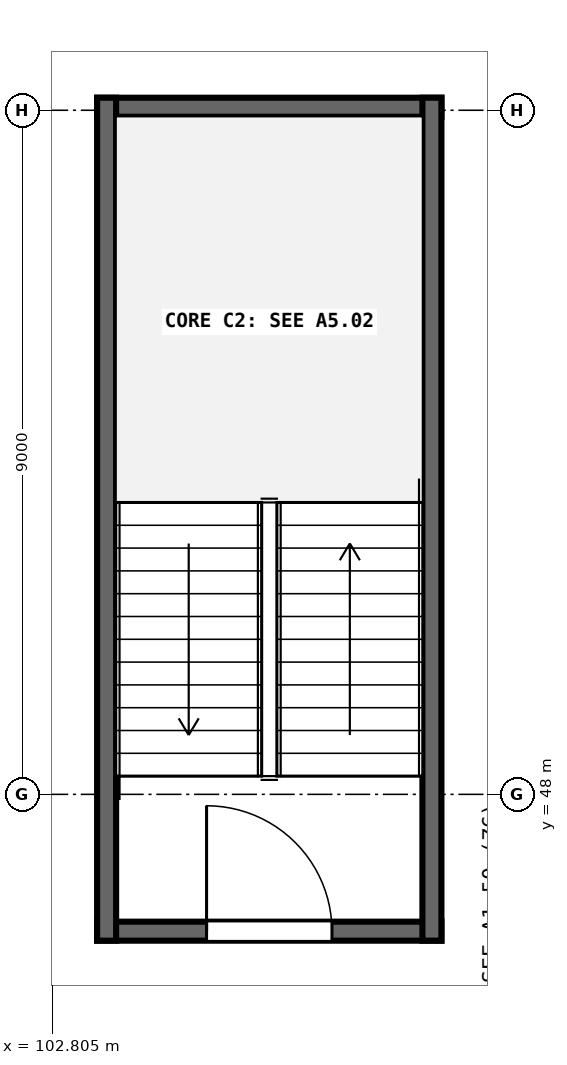
"""IFC4 building model, lengths in metres.
Left out: names, types, materials, properties, quantities, classifications, styles, units other than length and angle.
Written with IfcOpenShell. Run it as: python <this file> out.ifc"""

import sys

from ifc_helpers import new_model, si_unit, direction, frame, frame_2d, origin, place, context, subcontext, project, spatial, rectangle, extrude, element, fill, save


model = new_model("IFC4")
c1 = context("Model", 3, precision=1e-05, world=origin(), true_north=direction((0.0, 1.0)))
c2 = subcontext(c1, "Body", "Model", "MODEL_VIEW")
j1 = project(units=[si_unit("LENGTHUNIT", "METRE"), si_unit("PLANEANGLEUNIT", "RADIAN")], contexts=[c1])
p1 = place(None, origin())
s1 = spatial("IfcSite", under=j1, at=p1, CompositionType="ELEMENT")
p2 = place(p1, origin())
s2 = spatial("IfcBuilding", under=s1, at=p2, CompositionType="ELEMENT")
p3 = place(p2, frame((0.0, 0.0, 19.2)))
s3 = spatial("IfcBuildingStorey", under=s2, at=p3, CompositionType="ELEMENT", Elevation=19.2)
p4 = place(p3, frame((103.395, 46.2, 0.0), z_axis=(0.0, 0.0, 1.0), x_axis=(1.0, 0.0, 0.0)))
e1 = element("IfcWall", 1, at=p4, inside=s3, PredefinedType="SHEAR", context=c2, shape_type="SweptSolid", body=[
    extrude(rectangle(XDim=4.53, YDim=0.25, at=frame_2d((2.265, 0.0))), origin(), (0.0, 0.0, 1.0), 4.25),
])
p5 = place(p4, frame((1.44, 0.0, 0.0)))
e2 = element("IfcOpeningElement", 2, at=p5, cuts=e1, PredefinedType="OPENING", context=c2, shape_type="SweptSolid", body=[
    extrude(rectangle(XDim=1.65, YDim=2.22, at=frame_2d((0.825, 1.11))), frame((0.0, 0.135, 0.0), z_axis=(0.0, -1.0, 0.0), x_axis=(1.0, 0.0, 0.0)), (0.0, 0.0, 1.0), 0.27),
])
p6 = place(p3, frame((103.395, 57.04, 0.0), z_axis=(0.0, 0.0, 1.0), x_axis=(1.0, 0.0, 0.0)))
e3 = element("IfcWall", 3, at=p6, inside=s3, PredefinedType="SHEAR", context=c2, shape_type="SweptSolid", body=[
    extrude(rectangle(XDim=4.53, YDim=0.25, at=frame_2d((2.265, 0.0))), origin(), (0.0, 0.0, 1.0), 4.25),
])
for number, where, z_axis, x_axis in (
    (4, (103.52, 46.075, 0.0), (0.0, 0.0, 1.0), (0.0, 1.0, 0.0)),
    (5, (107.8, 46.075, 0.0), (0.0, 0.0, 1.0), (0.0, 1.0, 0.0)),
):
    element("IfcWall", number, at=place(p3, frame(where, z_axis=z_axis, x_axis=x_axis)), inside=s3, PredefinedType="SHEAR", context=c2, shape_type="SweptSolid", body=[
        extrude(rectangle(XDim=11.09, YDim=0.25, at=frame_2d((5.545, 0.0))), origin(), (0.0, 0.0, 1.0), 4.25),
    ])
p7 = place(p5, origin())
e6 = element("IfcDoor", 6, at=p7, inside=s3, OperationType="SINGLE_SWING_LEFT", PredefinedType="DOOR", context=c2, shape_type="SweptSolid", body=[
    extrude(rectangle(XDim=1.65, YDim=2.22, at=frame_2d((0.825, 1.11))), frame((0.0, 0.025, 0.0), z_axis=(0.0, -1.0, 0.0), x_axis=(1.0, 0.0, 0.0)), (0.0, 0.0, 1.0), 0.05),
])
fill(e2, e6)
save(model, sys.argv[1])
